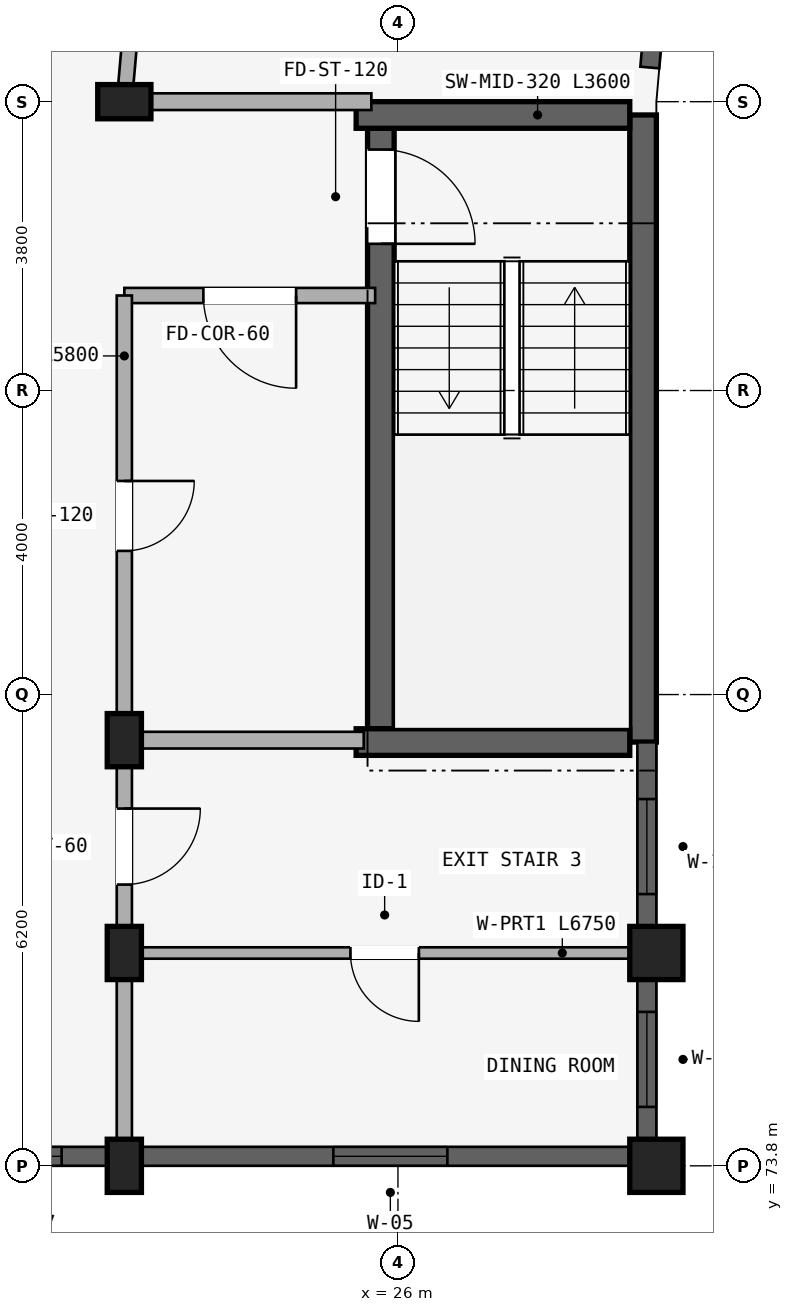
"""IFC4 building model, lengths in metres.
Left out: names, types, materials, properties, quantities, classifications, styles, units other than length and angle.
Written with IfcOpenShell. Run it as: python <this file> out.ifc"""

import sys

from ifc_helpers import new_model, si_unit, direction, frame, frame_2d, origin, origin_2d, place, context, subcontext, project, spatial, rectangle, extrude, element, fill, save


model = new_model("IFC4")
c1 = context("Model", 3, precision=1e-05, world=origin(), true_north=direction((0.0, 1.0)))
c2 = subcontext(c1, "Body", "Model", "MODEL_VIEW")
j1 = project(units=[si_unit("LENGTHUNIT", "METRE"), si_unit("PLANEANGLEUNIT", "RADIAN")], contexts=[c1])
p1 = place(None, origin())
s1 = spatial("IfcSite", under=j1, at=p1, CompositionType="ELEMENT")
p2 = place(p1, origin())
s2 = spatial("IfcBuilding", under=s1, at=p2, CompositionType="ELEMENT")
p3 = place(p2, frame((0.0, 0.0, 24.45)))
s3 = spatial("IfcBuildingStorey", under=s2, at=p3, CompositionType="ELEMENT", Elevation=24.45)
p4 = place(p3, frame((29.225, 87.625, 0.0), z_axis=(0.0, 0.0, 1.0), x_axis=(0.0, -1.0, 0.0)))
e1 = element("IfcWall", 1, at=p4, inside=s3, PredefinedType="SHEAR", context=c2, shape_type="SweptSolid", body=[
    extrude(rectangle(XDim=8.25, YDim=0.35, at=frame_2d((4.125, 0.0))), origin(), (0.0, 0.0, 1.0), 2.93),
])
p5 = place(p3, frame((25.775, 87.45, 0.0), z_axis=(0.0, 0.0, 1.0), x_axis=(0.0, -1.0, 0.0)))
e2 = element("IfcWall", 2, at=p5, inside=s3, PredefinedType="SHEAR", context=c2, shape_type="SweptSolid", body=[
    extrude(rectangle(XDim=7.9, YDim=0.35, at=frame_2d((3.95, 0.0))), origin(), (0.0, 0.0, 1.0), 2.93),
])
p6 = place(p5, frame((0.28, 0.0, 0.0)))
e3 = element("IfcOpeningElement", 3, at=p6, cuts=e2, PredefinedType="OPENING", context=c2, shape_type="SweptSolid", body=[
    extrude(rectangle(XDim=1.24, YDim=2.15, at=frame_2d((0.62, 1.075))), frame((0.0, 0.185, 0.0), z_axis=(0.0, -1.0, 0.0), x_axis=(1.0, 0.0, 0.0)), (0.0, 0.0, 1.0), 0.37),
])
for number, where, z_axis, x_axis in (
    (4, (29.05, 87.625, 0.0), (0.0, 0.0, 1.0), (-1.0, 0.0, 0.0)),
    (5, (29.05, 79.375, 0.0), (0.0, 0.0, 1.0), (-1.0, 0.0, 0.0)),
):
    element("IfcWall", number, at=place(p3, frame(where, z_axis=z_axis, x_axis=x_axis)), inside=s3, PredefinedType="SHEAR", context=c2, shape_type="SweptSolid", body=[
        extrude(rectangle(XDim=3.6, YDim=0.35, at=frame_2d((1.8, 0.0))), origin(), (0.0, 0.0, 1.0), 2.93),
    ])
for number, where, z_axis, x_axis in (
    (6, (22.4, 87.8, 0.0), (0.0, 0.0, 1.0), (0.0, 1.0, 0.0)),
    (7, (22.4, 79.4, 0.0), (0.0, 0.0, 1.0), (1.0, 0.0, 0.0)),
):
    element("IfcColumn", number, at=place(p3, frame(where, z_axis=z_axis, x_axis=x_axis)), inside=s3, PredefinedType="COLUMN", context=c2, shape_type="SweptSolid", body=[
        extrude(rectangle(XDim=0.45, YDim=0.7, at=origin_2d()), origin(), (0.0, 0.0, 1.0), 2.93),
    ])
p7 = place(p3, frame((29.4, 76.6, 0.0), z_axis=(0.0, 0.0, 1.0), x_axis=(1.0, 0.0, 0.0)))
e8 = element("IfcColumn", 8, at=p7, inside=s3, PredefinedType="COLUMN", context=c2, shape_type="SweptSolid", body=[
    extrude(rectangle(XDim=0.7, YDim=0.7, at=origin_2d()), origin(), (0.0, 0.0, 1.0), 2.93),
])
p8 = place(p3, frame((22.4, 76.6, 0.0), z_axis=(0.0, 0.0, 1.0), x_axis=(1.0, 0.0, 0.0)))
e9 = element("IfcColumn", 9, at=p8, inside=s3, PredefinedType="COLUMN", context=c2, shape_type="SweptSolid", body=[
    extrude(rectangle(XDim=0.45, YDim=0.7, at=origin_2d()), origin(), (0.0, 0.0, 1.0), 2.93),
])
p9 = place(p3, frame((29.4, 73.8, 0.0), z_axis=(0.0, 0.0, 1.0), x_axis=(1.0, 0.0, 0.0)))
e10 = element("IfcColumn", 10, at=p9, inside=s3, PredefinedType="COLUMN", context=c2, shape_type="SweptSolid", body=[
    extrude(rectangle(XDim=0.7, YDim=0.7, at=origin_2d()), origin(), (0.0, 0.0, 1.0), 2.97),
])
p10 = place(p3, frame((22.4, 73.8, 0.0), z_axis=(0.0, 0.0, 1.0), x_axis=(1.0, 0.0, 0.0)))
e11 = element("IfcColumn", 11, at=p10, inside=s3, PredefinedType="COLUMN", context=c2, shape_type="SweptSolid", body=[
    extrude(rectangle(XDim=0.45, YDim=0.7, at=origin_2d()), origin(), (0.0, 0.0, 1.0), 2.97),
])
p11 = place(p3, frame((25.7, 85.25, 0.0), z_axis=(0.0, 0.0, 1.0), x_axis=(-1.0, 0.0, 0.0)))
e12 = element("IfcWall", 12, at=p11, inside=s3, PredefinedType="STANDARD", context=c2, shape_type="SweptSolid", body=[
    extrude(rectangle(XDim=3.3, YDim=0.2, at=frame_2d((1.65, 0.0))), origin(), (0.0, 0.0, 1.0), 2.372),
])
p12 = place(p11, frame((1.04, 0.0, 0.0)))
e13 = element("IfcOpeningElement", 13, at=p12, cuts=e12, PredefinedType="OPENING", context=c2, shape_type="SweptSolid", body=[
    extrude(rectangle(XDim=1.22, YDim=2.15, at=frame_2d((0.61, 1.075))), frame((0.0, 0.11, 0.0), z_axis=(0.0, -1.0, 0.0), x_axis=(1.0, 0.0, 0.0)), (0.0, 0.0, 1.0), 0.22),
])
p13 = place(p3, frame((22.4, 85.25, 0.0), z_axis=(0.0, 0.0, 1.0), x_axis=(0.0, -1.0, 0.0)))
e14 = element("IfcWall", 14, at=p13, inside=s3, PredefinedType="STANDARD", context=c2, shape_type="SweptSolid", body=[
    extrude(rectangle(XDim=5.8, YDim=0.2, at=frame_2d((2.9, 0.0))), origin(), (0.0, 0.0, 1.0), 2.372),
])
p14 = place(p13, frame((2.44, 0.0, 0.0)))
e15 = element("IfcOpeningElement", 15, at=p14, cuts=e14, PredefinedType="OPENING", context=c2, shape_type="SweptSolid", body=[
    extrude(rectangle(XDim=0.92, YDim=2.1, at=frame_2d((0.46, 1.05))), frame((0.0, 0.11, 0.0), z_axis=(0.0, -1.0, 0.0), x_axis=(1.0, 0.0, 0.0)), (0.0, 0.0, 1.0), 0.22),
])
p15 = place(p3, frame((22.792, 92.28, 0.0), z_axis=(0.0, 0.0, 1.0), x_axis=(-0.087187153726, -0.996191949488, 0.0)))
e16 = element("IfcWall", 16, at=p15, inside=s3, PredefinedType="STANDARD", context=c2, shape_type="SweptSolid", body=[
    extrude(rectangle(XDim=4.497, YDim=0.2, at=frame_2d((2.249, 0.0))), origin(), (0.0, 0.0, 1.0), 2.372),
])
p16 = place(p3, frame((25.65, 87.8, 0.0), z_axis=(0.0, 0.0, 1.0), x_axis=(-1.0, 0.0, 0.0)))
e17 = element("IfcWall", 17, at=p16, inside=s3, PredefinedType="STANDARD", context=c2, shape_type="SweptSolid", body=[
    extrude(rectangle(XDim=3.2, YDim=0.22, at=frame_2d((1.6, 0.0))), origin(), (0.0, 0.0, 1.0), 2.372),
])
p17 = place(p3, frame((22.4, 79.4, 0.0), z_axis=(0.0, 0.0, 1.0), x_axis=(0.0, -1.0, 0.0)))
e18 = element("IfcWall", 18, at=p17, inside=s3, PredefinedType="STANDARD", context=c2, shape_type="SweptSolid", body=[
    extrude(rectangle(XDim=2.8, YDim=0.2, at=frame_2d((1.4, 0.0))), origin(), (0.0, 0.0, 1.0), 2.372),
])
p18 = place(p17, frame((0.9, 0.0, 0.0)))
e19 = element("IfcOpeningElement", 19, at=p18, cuts=e18, PredefinedType="OPENING", context=c2, shape_type="SweptSolid", body=[
    extrude(rectangle(XDim=1.0, YDim=2.15, at=frame_2d((0.5, 1.075))), frame((0.0, 0.11, 0.0), z_axis=(0.0, -1.0, 0.0), x_axis=(1.0, 0.0, 0.0)), (0.0, 0.0, 1.0), 0.22),
])
p19 = place(p3, frame((25.55, 79.4, 0.0), z_axis=(0.0, 0.0, 1.0), x_axis=(-1.0, 0.0, 0.0)))
e20 = element("IfcWall", 20, at=p19, inside=s3, PredefinedType="STANDARD", context=c2, shape_type="SweptSolid", body=[
    extrude(rectangle(XDim=3.1, YDim=0.22, at=frame_2d((1.55, 0.0))), origin(), (0.0, 0.0, 1.0), 2.372),
])
p20 = place(p3, frame((22.4, 76.6, 0.0), z_axis=(0.0, 0.0, 1.0), x_axis=(0.0, -1.0, 0.0)))
e21 = element("IfcWall", 21, at=p20, inside=s3, PredefinedType="STANDARD", context=c2, shape_type="SweptSolid", body=[
    extrude(rectangle(XDim=2.8, YDim=0.2, at=frame_2d((1.4, 0.0))), origin(), (0.0, 0.0, 1.0), 2.372),
])
p21 = place(p3, frame((29.2, 76.6, 0.0), z_axis=(0.0, 0.0, 1.0), x_axis=(-1.0, 0.0, 0.0)))
e22 = element("IfcWall", 22, at=p21, inside=s3, PredefinedType="PARTITIONING", context=c2, shape_type="SweptSolid", body=[
    extrude(rectangle(XDim=6.75, YDim=0.15, at=frame_2d((3.375, 0.0))), origin(), (0.0, 0.0, 1.0), 2.372),
])
p22 = place(p21, frame((2.925, 0.0, 0.0)))
e23 = element("IfcOpeningElement", 23, at=p22, cuts=e22, PredefinedType="OPENING", context=c2, shape_type="SweptSolid", body=[
    extrude(rectangle(XDim=0.9, YDim=2.1, at=frame_2d((0.45, 1.05))), frame((0.0, 0.085, 0.0), z_axis=(0.0, -1.0, 0.0), x_axis=(1.0, 0.0, 0.0)), (0.0, 0.0, 1.0), 0.17),
])
p23 = place(p3, frame((29.539, 90.823, 0.0), z_axis=(0.0, 0.0, 1.0), x_axis=(-0.087229084652, -0.996188278786, 0.0)))
e24 = element("IfcWall", 24, at=p23, inside=s3, PredefinedType="STANDARD", context=c2, shape_type="SweptSolid", body=[
    extrude(rectangle(XDim=2.583, YDim=0.25, at=frame_2d((1.292, 0.0))), origin(), (0.0, 0.0, 1.0), 2.422),
])
p24 = place(p23, frame((0.61, 0.0, 0.622)))
e25 = element("IfcOpeningElement", 25, at=p24, cuts=e24, PredefinedType="OPENING", context=c2, shape_type="SweptSolid", body=[
    extrude(rectangle(XDim=1.55, YDim=1.6, at=frame_2d((0.775, 0.8))), frame((0.0, 0.135, 0.0), z_axis=(0.0, -1.0, 0.0), x_axis=(1.0, 0.0, 0.0)), (0.0, 0.0, 1.0), 0.27),
])
p25 = place(p3, frame((29.275, 79.372, 0.0), z_axis=(0.0, 0.0, 1.0), x_axis=(0.0, -1.0, 0.0)))
e26 = element("IfcWall", 26, at=p25, inside=s3, PredefinedType="STANDARD", context=c2, shape_type="SweptSolid", body=[
    extrude(rectangle(XDim=2.418, YDim=0.25, at=frame_2d((1.209, 0.0))), origin(), (0.0, 0.0, 1.0), 2.472),
])
p26 = place(p25, frame((0.747, 0.0, 0.722)))
e27 = element("IfcOpeningElement", 27, at=p26, cuts=e26, PredefinedType="OPENING", context=c2, shape_type="SweptSolid", body=[
    extrude(rectangle(XDim=1.25, YDim=1.55, at=frame_2d((0.625, 0.775))), frame((0.0, 0.135, 0.0), z_axis=(0.0, -1.0, 0.0), x_axis=(1.0, 0.0, 0.0)), (0.0, 0.0, 1.0), 0.27),
])
p27 = place(p3, frame((29.275, 76.247, 0.0), z_axis=(0.0, 0.0, 1.0), x_axis=(0.0, -1.0, 0.0)))
e28 = element("IfcWall", 28, at=p27, inside=s3, PredefinedType="STANDARD", context=c2, shape_type="SweptSolid", body=[
    extrude(rectangle(XDim=2.093, YDim=0.25, at=frame_2d((1.046, 0.0))), origin(), (0.0, 0.0, 1.0), 2.472),
])
p28 = place(p27, frame((0.421, 0.0, 0.722)))
e29 = element("IfcOpeningElement", 29, at=p28, cuts=e28, PredefinedType="OPENING", context=c2, shape_type="SweptSolid", body=[
    extrude(rectangle(XDim=1.25, YDim=1.55, at=frame_2d((0.625, 0.775))), frame((0.0, 0.135, 0.0), z_axis=(0.0, -1.0, 0.0), x_axis=(1.0, 0.0, 0.0)), (0.0, 0.0, 1.0), 0.27),
])
p29 = place(p3, frame((29.046, 73.925, 0.0), z_axis=(0.0, 0.0, 1.0), x_axis=(-1.0, 0.0, 0.0)))
e30 = element("IfcWall", 30, at=p29, inside=s3, PredefinedType="STANDARD", context=c2, shape_type="SweptSolid", body=[
    extrude(rectangle(XDim=6.418, YDim=0.25, at=frame_2d((3.209, 0.0))), origin(), (0.0, 0.0, 1.0), 2.372),
])
p30 = place(p29, frame((2.396, 0.0, 0.522)))
e31 = element("IfcOpeningElement", 31, at=p30, cuts=e30, PredefinedType="OPENING", context=c2, shape_type="SweptSolid", body=[
    extrude(rectangle(XDim=1.5, YDim=1.65, at=frame_2d((0.75, 0.825))), frame((0.0, 0.135, 0.0), z_axis=(0.0, -1.0, 0.0), x_axis=(1.0, 0.0, 0.0)), (0.0, 0.0, 1.0), 0.27),
])
p31 = place(p3, frame((22.171, 73.925, 0.0), z_axis=(0.0, 0.0, 1.0), x_axis=(-1.0, 0.0, 0.0)))
e32 = element("IfcWall", 32, at=p31, inside=s3, PredefinedType="STANDARD", context=c2, shape_type="SweptSolid", body=[
    extrude(rectangle(XDim=1.943, YDim=0.25, at=frame_2d((0.971, 0.0))), origin(), (0.0, 0.0, 1.0), 2.372),
])
p32 = place(p31, frame((0.596, 0.0, 0.88)))
e33 = element("IfcOpeningElement", 33, at=p32, cuts=e32, PredefinedType="OPENING", context=c2, shape_type="SweptSolid", body=[
    extrude(rectangle(XDim=0.75, YDim=1.05, at=frame_2d((0.375, 0.525))), frame((0.0, 0.135, 0.0), z_axis=(0.0, -1.0, 0.0), x_axis=(1.0, 0.0, 0.0)), (0.0, 0.0, 1.0), 0.27),
])
p33 = place(p26, origin())
e34 = element("IfcWindow", 34, at=p33, inside=s3, PartitioningType="SINGLE_PANEL", PredefinedType="WINDOW", context=c2, shape_type="SweptSolid", body=[
    extrude(rectangle(XDim=1.25, YDim=1.55, at=frame_2d((0.625, 0.775))), frame((0.0, 0.03, 0.0), z_axis=(0.0, -1.0, 0.0), x_axis=(1.0, 0.0, 0.0)), (0.0, 0.0, 1.0), 0.06),
])
fill(e27, e34)
p34 = place(p28, origin())
e35 = element("IfcWindow", 35, at=p34, inside=s3, PartitioningType="SINGLE_PANEL", PredefinedType="WINDOW", context=c2, shape_type="SweptSolid", body=[
    extrude(rectangle(XDim=1.25, YDim=1.55, at=frame_2d((0.625, 0.775))), frame((0.0, 0.03, 0.0), z_axis=(0.0, -1.0, 0.0), x_axis=(1.0, 0.0, 0.0)), (0.0, 0.0, 1.0), 0.06),
])
fill(e29, e35)
p35 = place(p30, origin())
e36 = element("IfcWindow", 36, at=p35, inside=s3, PartitioningType="DOUBLE_PANEL_VERTICAL", PredefinedType="WINDOW", context=c2, shape_type="SweptSolid", body=[
    extrude(rectangle(XDim=1.5, YDim=1.65, at=frame_2d((0.75, 0.825))), frame((0.0, 0.03, 0.0), z_axis=(0.0, -1.0, 0.0), x_axis=(1.0, 0.0, 0.0)), (0.0, 0.0, 1.0), 0.06),
])
fill(e31, e36)
p36 = place(p32, origin())
e37 = element("IfcWindow", 37, at=p36, inside=s3, PartitioningType="SINGLE_PANEL", PredefinedType="WINDOW", context=c2, shape_type="SweptSolid", body=[
    extrude(rectangle(XDim=0.75, YDim=1.05, at=frame_2d((0.375, 0.525))), frame((0.0, 0.03, 0.0), z_axis=(0.0, -1.0, 0.0), x_axis=(1.0, 0.0, 0.0)), (0.0, 0.0, 1.0), 0.06),
])
fill(e33, e37)
p37 = place(p6, origin())
e38 = element("IfcDoor", 38, at=p37, inside=s3, OperationType="SINGLE_SWING_RIGHT", PredefinedType="DOOR", context=c2, shape_type="SweptSolid", body=[
    extrude(rectangle(XDim=1.24, YDim=2.15, at=frame_2d((0.62, 1.075))), frame((0.0, 0.025, 0.0), z_axis=(0.0, -1.0, 0.0), x_axis=(1.0, 0.0, 0.0)), (0.0, 0.0, 1.0), 0.05),
])
fill(e3, e38)
p38 = place(p12, frame((1.22, 0.0, 0.0), z_axis=(0.0, 0.0, 1.0), x_axis=(-1.0, 0.0, 0.0)))
e39 = element("IfcDoor", 39, at=p38, inside=s3, OperationType="SINGLE_SWING_RIGHT", PredefinedType="DOOR", context=c2, shape_type="SweptSolid", body=[
    extrude(rectangle(XDim=1.22, YDim=2.15, at=frame_2d((0.61, 1.075))), frame((0.0, 0.025, 0.0), z_axis=(0.0, -1.0, 0.0), x_axis=(1.0, 0.0, 0.0)), (0.0, 0.0, 1.0), 0.05),
])
fill(e13, e39)
p39 = place(p14, origin())
e40 = element("IfcDoor", 40, at=p39, inside=s3, OperationType="SINGLE_SWING_LEFT", PredefinedType="DOOR", context=c2, shape_type="SweptSolid", body=[
    extrude(rectangle(XDim=0.92, YDim=2.1, at=frame_2d((0.46, 1.05))), frame((0.0, 0.025, 0.0), z_axis=(0.0, -1.0, 0.0), x_axis=(1.0, 0.0, 0.0)), (0.0, 0.0, 1.0), 0.05),
])
fill(e15, e40)
p40 = place(p18, origin())
e41 = element("IfcDoor", 41, at=p40, inside=s3, OperationType="SINGLE_SWING_LEFT", PredefinedType="DOOR", context=c2, shape_type="SweptSolid", body=[
    extrude(rectangle(XDim=1.0, YDim=2.15, at=frame_2d((0.5, 1.075))), frame((0.0, 0.025, 0.0), z_axis=(0.0, -1.0, 0.0), x_axis=(1.0, 0.0, 0.0)), (0.0, 0.0, 1.0), 0.05),
])
fill(e19, e41)
p41 = place(p22, origin())
e42 = element("IfcDoor", 42, at=p41, inside=s3, OperationType="SINGLE_SWING_LEFT", PredefinedType="DOOR", context=c2, shape_type="SweptSolid", body=[
    extrude(rectangle(XDim=0.9, YDim=2.1, at=frame_2d((0.45, 1.05))), frame((0.0, 0.025, 0.0), z_axis=(0.0, -1.0, 0.0), x_axis=(1.0, 0.0, 0.0)), (0.0, 0.0, 1.0), 0.05),
])
fill(e23, e42)
save(model, sys.argv[1])
